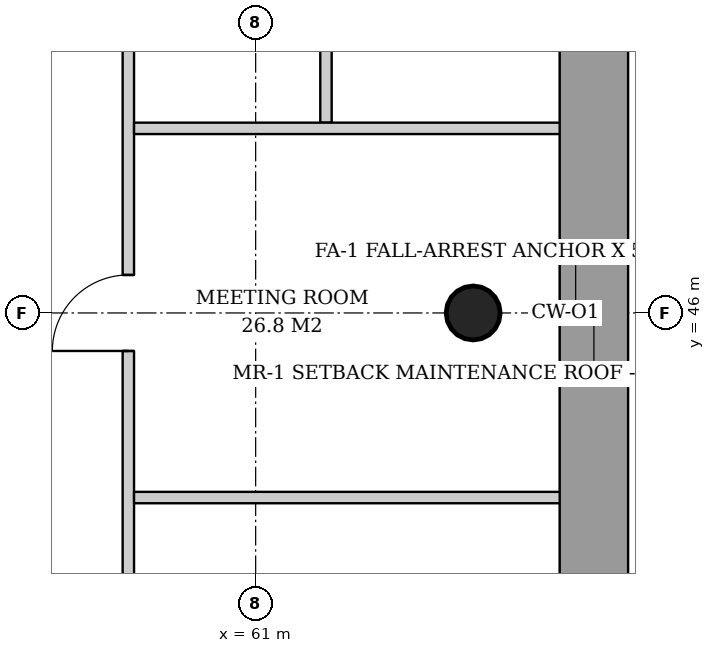
"""IFC4 building model, lengths in metres.
Left out: names, types, materials, properties, quantities, classifications, styles, units other than length and angle.
Written with IfcOpenShell. Run it as: python <this file> out.ifc"""

import sys

from ifc_helpers import new_model, si_unit, direction, frame, frame_2d, origin, origin_2d, place, context, subcontext, project, spatial, rectangle, hollow_circle, extrude, element, fill, save


model = new_model("IFC4")
c1 = context("Model", 3, precision=1e-05, world=origin(), true_north=direction((0.0, 1.0)))
c2 = subcontext(c1, "Body", "Model", "MODEL_VIEW")
j1 = project(units=[si_unit("LENGTHUNIT", "METRE"), si_unit("PLANEANGLEUNIT", "RADIAN")], contexts=[c1])
p1 = place(None, origin())
s1 = spatial("IfcSite", under=j1, at=p1, CompositionType="ELEMENT")
p2 = place(p1, origin())
s2 = spatial("IfcBuilding", under=s1, at=p2, CompositionType="ELEMENT")
p3 = place(p2, frame((0.0, 0.0, 180.6)))
s3 = spatial("IfcBuildingStorey", under=s2, at=p3, CompositionType="ELEMENT", Elevation=180.6)
p4 = place(p3, frame((63.9, 46.0, 0.0), z_axis=(-0.031916396774, 0.0, 0.999490542035), x_axis=(0.0, -1.0, 0.0)))
e1 = element("IfcColumn", 1, at=p4, inside=s3, PredefinedType="COLUMN", context=c2, shape_type="SweptSolid", body=[
    extrude(hollow_circle(Radius=0.355, WallThickness=0.025, at=origin_2d()), origin(), (0.0, 0.0, 1.0), 3.802),
])
p5 = place(p3, frame((61.925, 48.504, 0.0), z_axis=(0.0, 0.0, 1.0), x_axis=(0.0, 1.0, 0.0)))
e2 = element("IfcWall", 2, at=p5, inside=s3, PredefinedType="PARTITIONING", context=c2, shape_type="SweptSolid", body=[
    extrude(rectangle(XDim=4.707, YDim=0.15, at=frame_2d((2.354, 0.0))), origin(), (0.0, 0.0, 1.0), 2.867),
])
p6 = place(p3, frame((59.325, 32.457, 0.0), z_axis=(0.0, 0.0, 1.0), x_axis=(0.0, 1.0, 0.0)))
e3 = element("IfcWall", 3, at=p6, inside=s3, PredefinedType="PARTITIONING", context=c2, shape_type="SweptSolid", body=[
    extrude(rectangle(XDim=27.086, YDim=0.15, at=frame_2d((13.543, 0.0))), origin(), (0.0, 0.0, 1.0), 2.867),
])
p7 = place(p6, frame((3.329, 0.0, 0.0)))
e4 = element("IfcOpeningElement", 4, at=p7, cuts=e3, PredefinedType="OPENING", context=c2, shape_type="SweptSolid", body=[
    extrude(rectangle(XDim=1.0, YDim=2.1, at=frame_2d((0.5, 1.05))), frame((0.0, 0.085, 0.0), z_axis=(0.0, -1.0, 0.0), x_axis=(1.0, 0.0, 0.0)), (0.0, 0.0, 1.0), 0.17),
])
p8 = place(p6, frame((8.186, 0.0, 0.0)))
e5 = element("IfcOpeningElement", 5, at=p8, cuts=e3, PredefinedType="OPENING", context=c2, shape_type="SweptSolid", body=[
    extrude(rectangle(XDim=1.0, YDim=2.1, at=frame_2d((0.5, 1.05))), frame((0.0, 0.085, 0.0), z_axis=(0.0, -1.0, 0.0), x_axis=(1.0, 0.0, 0.0)), (0.0, 0.0, 1.0), 0.17),
])
p9 = place(p6, frame((13.043, 0.0, 0.0)))
e6 = element("IfcOpeningElement", 6, at=p9, cuts=e3, PredefinedType="OPENING", context=c2, shape_type="SweptSolid", body=[
    extrude(rectangle(XDim=1.0, YDim=2.1, at=frame_2d((0.5, 1.05))), frame((0.0, 0.085, 0.0), z_axis=(0.0, -1.0, 0.0), x_axis=(1.0, 0.0, 0.0)), (0.0, 0.0, 1.0), 0.17),
])
p10 = place(p6, frame((17.9, 0.0, 0.0)))
e7 = element("IfcOpeningElement", 7, at=p10, cuts=e3, PredefinedType="OPENING", context=c2, shape_type="SweptSolid", body=[
    extrude(rectangle(XDim=1.0, YDim=2.1, at=frame_2d((0.5, 1.05))), frame((0.0, 0.085, 0.0), z_axis=(0.0, -1.0, 0.0), x_axis=(1.0, 0.0, 0.0)), (0.0, 0.0, 1.0), 0.17),
])
p11 = place(p6, frame((22.757, 0.0, 0.0)))
e8 = element("IfcOpeningElement", 8, at=p11, cuts=e3, PredefinedType="OPENING", context=c2, shape_type="SweptSolid", body=[
    extrude(rectangle(XDim=1.0, YDim=2.1, at=frame_2d((0.5, 1.05))), frame((0.0, 0.085, 0.0), z_axis=(0.0, -1.0, 0.0), x_axis=(1.0, 0.0, 0.0)), (0.0, 0.0, 1.0), 0.17),
])
p12 = place(p3, frame((59.4, 43.572, 0.0), z_axis=(0.0, 0.0, 1.0), x_axis=(1.0, 0.0, 0.0)))
e9 = element("IfcWall", 9, at=p12, inside=s3, PredefinedType="PARTITIONING", context=c2, shape_type="SweptSolid", body=[
    extrude(rectangle(XDim=5.64, YDim=0.15, at=frame_2d((2.82, 0.0))), origin(), (0.0, 0.0, 1.0), 3.12),
])
p13 = place(p3, frame((59.4, 48.428, 0.0), z_axis=(0.0, 0.0, 1.0), x_axis=(1.0, 0.0, 0.0)))
e10 = element("IfcWall", 10, at=p13, inside=s3, PredefinedType="PARTITIONING", context=c2, shape_type="SweptSolid", body=[
    extrude(rectangle(XDim=5.64, YDim=0.15, at=frame_2d((2.82, 0.0))), origin(), (0.0, 0.0, 1.0), 2.867),
])
p14 = place(p9, origin())
e11 = element("IfcDoor", 11, at=p14, inside=s3, OperationType="SINGLE_SWING_LEFT", PredefinedType="DOOR", context=c2, shape_type="SweptSolid", body=[
    extrude(rectangle(XDim=1.0, YDim=2.1, at=frame_2d((0.5, 1.05))), frame((0.0, 0.025, 0.0), z_axis=(0.0, -1.0, 0.0), x_axis=(1.0, 0.0, 0.0)), (0.0, 0.0, 1.0), 0.05),
])
fill(e6, e11)
save(model, sys.argv[1])
